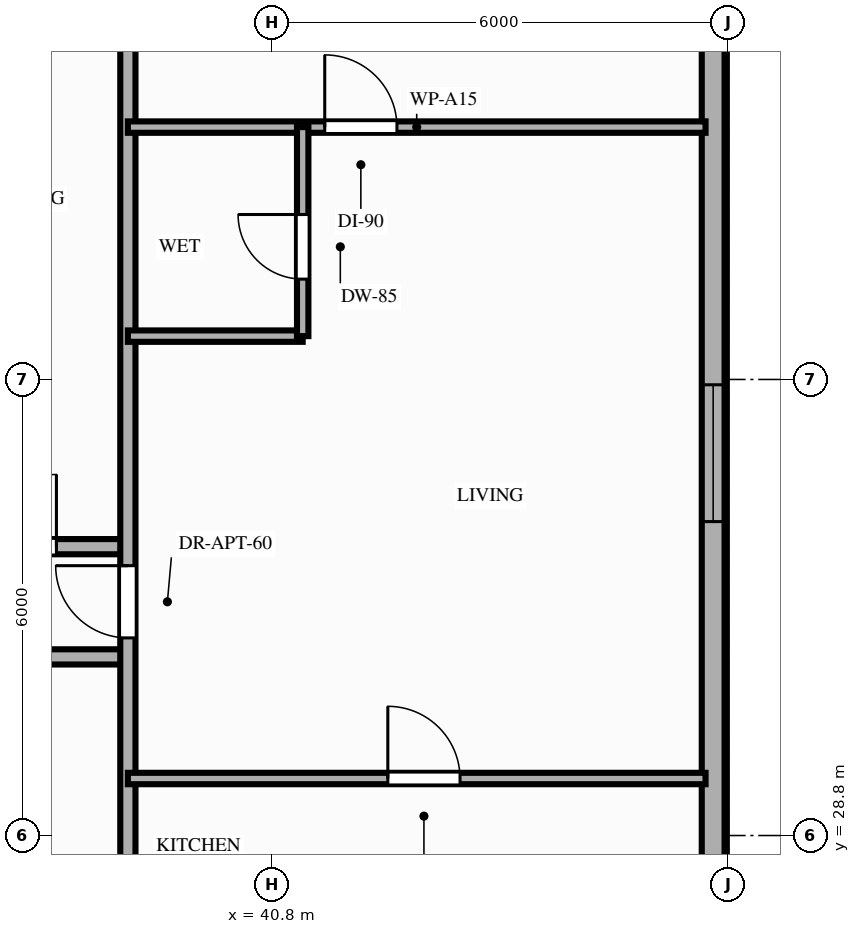
"""IFC4 building model, lengths in metres.
Left out: names, types, materials, properties, quantities, classifications, styles, units other than length and angle.
Written with IfcOpenShell. Run it as: python <this file> out.ifc"""

import sys

from ifc_helpers import new_model, si_unit, direction, frame, frame_2d, origin, place, context, subcontext, project, spatial, rectangle, extrude, element, fill, save


model = new_model("IFC4")
c1 = context("Model", 3, precision=1e-05, world=origin(), true_north=direction((0.0, 1.0)))
c2 = subcontext(c1, "Body", "Model", "MODEL_VIEW")
j1 = project(units=[si_unit("LENGTHUNIT", "METRE"), si_unit("PLANEANGLEUNIT", "RADIAN")], contexts=[c1])
p1 = place(None, origin())
s1 = spatial("IfcSite", under=j1, at=p1, CompositionType="ELEMENT")
p2 = place(p1, origin())
s2 = spatial("IfcBuilding", under=s1, at=p2, CompositionType="ELEMENT")
p3 = place(p2, frame((0.0, 0.0, 133.0)))
s3 = spatial("IfcBuildingStorey", under=s2, at=p3, CompositionType="ELEMENT", Elevation=133.0)
p4 = place(p3, frame((46.6, 26.8, 0.0), z_axis=(0.0, 0.0, 1.0), x_axis=(0.0, 1.0, 0.0)))
e1 = element("IfcWall", 1, at=p4, inside=s3, PredefinedType="STANDARD", context=c2, shape_type="SweptSolid", body=[
    extrude(rectangle(XDim=15.35, YDim=0.3, at=frame_2d((7.675, 0.0))), origin(), (0.0, 0.0, 1.0), 3.02),
])
p5 = place(p4, frame((6.13, 0.0, 0.85)))
e2 = element("IfcOpeningElement", 2, at=p5, cuts=e1, PredefinedType="OPENING", context=c2, shape_type="SweptSolid", body=[
    extrude(rectangle(XDim=1.8, YDim=1.75, at=frame_2d((0.9, 0.875))), frame((0.0, 0.16, 0.0), z_axis=(0.0, -1.0, 0.0), x_axis=(1.0, 0.0, 0.0)), (0.0, 0.0, 1.0), 0.32),
])
p6 = place(p3, frame((27.15, 31.15, 0.0), z_axis=(0.0, 0.0, 1.0), x_axis=(1.0, 0.0, 0.0)))
e3 = element("IfcWall", 3, at=p6, inside=s3, PredefinedType="PARTITIONING", context=c2, shape_type="SweptSolid", body=[
    extrude(rectangle(XDim=11.75, YDim=0.2, at=frame_2d((5.875, 0.0))), origin(), (0.0, 0.0, 1.0), 2.46),
])
p7 = place(p6, frame((5.39, 0.0, 0.0)))
e4 = element("IfcOpeningElement", 4, at=p7, cuts=e3, PredefinedType="OPENING", context=c2, shape_type="SweptSolid", body=[
    extrude(rectangle(XDim=0.95, YDim=2.15, at=frame_2d((0.475, 1.075))), frame((0.0, 0.11, 0.0), z_axis=(0.0, -1.0, 0.0), x_axis=(1.0, 0.0, 0.0)), (0.0, 0.0, 1.0), 0.22),
])
p8 = place(p3, frame((27.15, 32.6, 0.0), z_axis=(0.0, 0.0, 1.0), x_axis=(1.0, 0.0, 0.0)))
e5 = element("IfcWall", 5, at=p8, inside=s3, PredefinedType="PARTITIONING", context=c2, shape_type="SweptSolid", body=[
    extrude(rectangle(XDim=11.75, YDim=0.2, at=frame_2d((5.875, 0.0))), origin(), (0.0, 0.0, 1.0), 2.46),
])
p9 = place(p8, frame((1.17, 0.0, 0.0)))
e6 = element("IfcOpeningElement", 6, at=p9, cuts=e5, PredefinedType="OPENING", context=c2, shape_type="SweptSolid", body=[
    extrude(rectangle(XDim=0.95, YDim=2.15, at=frame_2d((0.475, 1.075))), frame((0.0, 0.11, 0.0), z_axis=(0.0, -1.0, 0.0), x_axis=(1.0, 0.0, 0.0)), (0.0, 0.0, 1.0), 0.22),
])
p10 = place(p8, frame((4.1, 0.0, 0.0)))
e7 = element("IfcOpeningElement", 7, at=p10, cuts=e5, PredefinedType="OPENING", context=c2, shape_type="SweptSolid", body=[
    extrude(rectangle(XDim=0.95, YDim=2.15, at=frame_2d((0.475, 1.075))), frame((0.0, 0.11, 0.0), z_axis=(0.0, -1.0, 0.0), x_axis=(1.0, 0.0, 0.0)), (0.0, 0.0, 1.0), 0.22),
])
p11 = place(p8, frame((6.92, 0.0, 0.0)))
e8 = element("IfcOpeningElement", 8, at=p11, cuts=e5, PredefinedType="OPENING", context=c2, shape_type="SweptSolid", body=[
    extrude(rectangle(XDim=0.95, YDim=2.15, at=frame_2d((0.475, 1.075))), frame((0.0, 0.11, 0.0), z_axis=(0.0, -1.0, 0.0), x_axis=(1.0, 0.0, 0.0)), (0.0, 0.0, 1.0), 0.22),
])
p12 = place(p8, frame((9.86, 0.0, 0.0)))
e9 = element("IfcOpeningElement", 9, at=p12, cuts=e5, PredefinedType="OPENING", context=c2, shape_type="SweptSolid", body=[
    extrude(rectangle(XDim=0.95, YDim=2.15, at=frame_2d((0.475, 1.075))), frame((0.0, 0.11, 0.0), z_axis=(0.0, -1.0, 0.0), x_axis=(1.0, 0.0, 0.0)), (0.0, 0.0, 1.0), 0.22),
])
p13 = place(p3, frame((38.9, 26.75, 0.0), z_axis=(0.0, 0.0, 1.0), x_axis=(0.0, 1.0, 0.0)))
e10 = element("IfcWall", 10, at=p13, inside=s3, PredefinedType="PARTITIONING", context=c2, shape_type="SweptSolid", body=[
    extrude(rectangle(XDim=15.45, YDim=0.2, at=frame_2d((7.725, 0.0))), origin(), (0.0, 0.0, 1.0), 2.46),
])
p14 = place(p13, frame((4.65, 0.0, 0.0)))
e11 = element("IfcOpeningElement", 11, at=p14, cuts=e10, PredefinedType="OPENING", context=c2, shape_type="SweptSolid", body=[
    extrude(rectangle(XDim=0.95, YDim=2.15, at=frame_2d((0.475, 1.075))), frame((0.0, 0.11, 0.0), z_axis=(0.0, -1.0, 0.0), x_axis=(1.0, 0.0, 0.0)), (0.0, 0.0, 1.0), 0.22),
])
p15 = place(p3, frame((38.9, 29.55, 0.0), z_axis=(0.0, 0.0, 1.0), x_axis=(1.0, 0.0, 0.0)))
e12 = element("IfcWall", 12, at=p15, inside=s3, PredefinedType="PARTITIONING", context=c2, shape_type="SweptSolid", body=[
    extrude(rectangle(XDim=7.6, YDim=0.15, at=frame_2d((3.8, 0.0))), origin(), (0.0, 0.0, 1.0), 2.46),
])
p16 = place(p15, frame((3.42, 0.0, 0.0)))
e13 = element("IfcOpeningElement", 13, at=p16, cuts=e12, PredefinedType="OPENING", context=c2, shape_type="SweptSolid", body=[
    extrude(rectangle(XDim=0.95, YDim=2.15, at=frame_2d((0.475, 1.075))), frame((0.0, 0.085, 0.0), z_axis=(0.0, -1.0, 0.0), x_axis=(1.0, 0.0, 0.0)), (0.0, 0.0, 1.0), 0.17),
])
p17 = place(p3, frame((38.9, 38.12, 0.0), z_axis=(0.0, 0.0, 1.0), x_axis=(1.0, 0.0, 0.0)))
e14 = element("IfcWall", 14, at=p17, inside=s3, PredefinedType="PARTITIONING", context=c2, shape_type="SweptSolid", body=[
    extrude(rectangle(XDim=7.6, YDim=0.15, at=frame_2d((3.8, 0.0))), origin(), (0.0, 0.0, 1.0), 2.46),
])
p18 = place(p17, frame((2.59, 0.0, 0.0)))
e15 = element("IfcOpeningElement", 15, at=p18, cuts=e14, PredefinedType="OPENING", context=c2, shape_type="SweptSolid", body=[
    extrude(rectangle(XDim=0.95, YDim=2.15, at=frame_2d((0.475, 1.075))), frame((0.0, 0.085, 0.0), z_axis=(0.0, -1.0, 0.0), x_axis=(1.0, 0.0, 0.0)), (0.0, 0.0, 1.0), 0.17),
])
p19 = place(p3, frame((38.9, 35.37, 0.0), z_axis=(0.0, 0.0, 1.0), x_axis=(1.0, 0.0, 0.0)))
e16 = element("IfcWall", 16, at=p19, inside=s3, PredefinedType="PARTITIONING", context=c2, shape_type="SweptSolid", body=[
    extrude(rectangle(XDim=2.3, YDim=0.15, at=frame_2d((1.15, 0.0))), origin(), (0.0, 0.0, 1.0), 2.46),
])
p20 = place(p3, frame((41.2, 35.37, 0.0), z_axis=(0.0, 0.0, 1.0), x_axis=(0.0, 1.0, 0.0)))
e17 = element("IfcWall", 17, at=p20, inside=s3, PredefinedType="PARTITIONING", context=c2, shape_type="SweptSolid", body=[
    extrude(rectangle(XDim=2.75, YDim=0.15, at=frame_2d((1.375, 0.0))), origin(), (0.0, 0.0, 1.0), 2.46),
])
p21 = place(p20, frame((0.75, 0.0, 0.0)))
e18 = element("IfcOpeningElement", 18, at=p21, cuts=e17, PredefinedType="OPENING", context=c2, shape_type="SweptSolid", body=[
    extrude(rectangle(XDim=0.85, YDim=2.1, at=frame_2d((0.425, 1.05))), frame((0.0, 0.085, 0.0), z_axis=(0.0, -1.0, 0.0), x_axis=(1.0, 0.0, 0.0)), (0.0, 0.0, 1.0), 0.17),
])
p22 = place(p5, origin())
e19 = element("IfcWindow", 19, at=p22, inside=s3, PartitioningType="SINGLE_PANEL", PredefinedType="WINDOW", context=c2, shape_type="SweptSolid", body=[
    extrude(rectangle(XDim=1.8, YDim=1.75, at=frame_2d((0.9, 0.875))), frame((0.0, 0.03, 0.0), z_axis=(0.0, -1.0, 0.0), x_axis=(1.0, 0.0, 0.0)), (0.0, 0.0, 1.0), 0.06),
])
fill(e2, e19)
p23 = place(p14, origin())
e20 = element("IfcDoor", 20, at=p23, inside=s3, OperationType="SINGLE_SWING_RIGHT", PredefinedType="DOOR", context=c2, shape_type="SweptSolid", body=[
    extrude(rectangle(XDim=0.95, YDim=2.15, at=frame_2d((0.475, 1.075))), frame((0.0, 0.025, 0.0), z_axis=(0.0, -1.0, 0.0), x_axis=(1.0, 0.0, 0.0)), (0.0, 0.0, 1.0), 0.05),
])
fill(e11, e20)
p24 = place(p18, origin())
e21 = element("IfcDoor", 21, at=p24, inside=s3, OperationType="SINGLE_SWING_LEFT", PredefinedType="DOOR", context=c2, shape_type="SweptSolid", body=[
    extrude(rectangle(XDim=0.95, YDim=2.15, at=frame_2d((0.475, 1.075))), frame((0.0, 0.025, 0.0), z_axis=(0.0, -1.0, 0.0), x_axis=(1.0, 0.0, 0.0)), (0.0, 0.0, 1.0), 0.05),
])
fill(e15, e21)
p25 = place(p21, origin())
e22 = element("IfcDoor", 22, at=p25, inside=s3, OperationType="SINGLE_SWING_RIGHT", PredefinedType="DOOR", context=c2, shape_type="SweptSolid", body=[
    extrude(rectangle(XDim=0.85, YDim=2.1, at=frame_2d((0.425, 1.05))), frame((0.0, 0.025, 0.0), z_axis=(0.0, -1.0, 0.0), x_axis=(1.0, 0.0, 0.0)), (0.0, 0.0, 1.0), 0.05),
])
fill(e18, e22)
p26 = place(p16, origin())
e23 = element("IfcDoor", 23, at=p26, inside=s3, OperationType="SINGLE_SWING_LEFT", PredefinedType="DOOR", context=c2, shape_type="SweptSolid", body=[
    extrude(rectangle(XDim=0.95, YDim=2.15, at=frame_2d((0.475, 1.075))), frame((0.0, 0.025, 0.0), z_axis=(0.0, -1.0, 0.0), x_axis=(1.0, 0.0, 0.0)), (0.0, 0.0, 1.0), 0.05),
])
fill(e13, e23)
p27 = place(p12, origin())
e24 = element("IfcDoor", 24, at=p27, inside=s3, OperationType="SINGLE_SWING_RIGHT", PredefinedType="DOOR", context=c2, shape_type="SweptSolid", body=[
    extrude(rectangle(XDim=0.95, YDim=2.15, at=frame_2d((0.475, 1.075))), frame((0.0, 0.025, 0.0), z_axis=(0.0, -1.0, 0.0), x_axis=(1.0, 0.0, 0.0)), (0.0, 0.0, 1.0), 0.05),
])
fill(e9, e24)
save(model, sys.argv[1])
